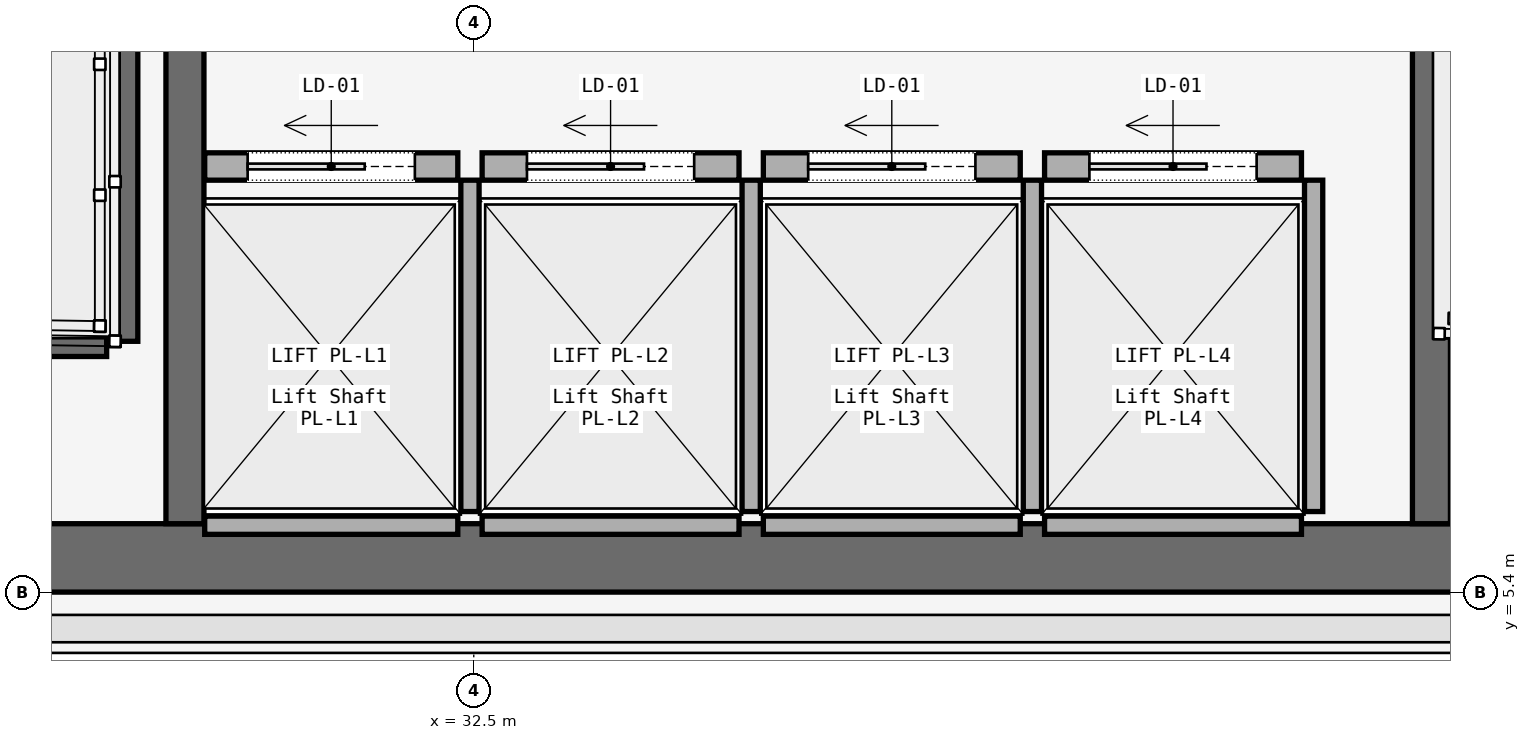
"""IFC4 building model, lengths in metres.
Left out: names, types, materials, properties, quantities, classifications, styles, units other than length and angle.
Written with IfcOpenShell. Run it as: python <this file> out.ifc"""

import sys

from ifc_helpers import new_model, si_unit, direction, frame, frame_2d, origin, place, context, subcontext, project, spatial, rectangle, extrude, element, fill, save


model = new_model("IFC4")
c1 = context("Model", 3, precision=1e-05, world=origin(), true_north=direction((0.0, 1.0)))
c2 = subcontext(c1, "Body", "Model", "MODEL_VIEW")
j1 = project(units=[si_unit("LENGTHUNIT", "METRE"), si_unit("PLANEANGLEUNIT", "RADIAN")], contexts=[c1])
p1 = place(None, origin())
s1 = spatial("IfcSite", under=j1, at=p1, CompositionType="ELEMENT")
p2 = place(p1, origin())
s2 = spatial("IfcBuilding", under=s1, at=p2, CompositionType="ELEMENT")
p3 = place(p2, frame((0.0, 0.0, 58.8)))
s3 = spatial("IfcBuildingStorey", under=s2, at=p3, CompositionType="ELEMENT", Elevation=58.8)
p4 = place(p3, frame((26.45, 5.625, 0.0), z_axis=(0.0, 0.0, 1.0), x_axis=(1.0, 0.0, 0.0)))
e1 = element("IfcWall", 1, at=p4, inside=s3, PredefinedType="SOLIDWALL", context=c2, shape_type="SweptSolid", body=[
    extrude(rectangle(XDim=31.1, YDim=0.45, at=frame_2d((15.55, 0.0))), origin(), (0.0, 0.0, 1.0), 3.58),
])
for number, where, z_axis, x_axis in (
    (2, (30.6, 5.85, 0.0), (0.0, 0.0, 1.0), (0.0, 1.0, 0.0)),
    (3, (38.8, 5.85, 0.0), (0.0, 0.0, 1.0), (0.0, 1.0, 0.0)),
):
    element("IfcWall", number, at=place(p3, frame(where, z_axis=z_axis, x_axis=x_axis)), inside=s3, PredefinedType="SOLIDWALL", context=c2, shape_type="SweptSolid", body=[
        extrude(rectangle(XDim=8.9, YDim=0.25, at=frame_2d((4.45, 0.0))), origin(), (0.0, 0.0, 1.0), 3.58),
    ])
p5 = place(p3, frame((30.19, 14.7, 0.0), z_axis=(0.0, 0.0, 1.0), x_axis=(0.0, -1.0, 0.0)))
e4 = element("IfcWall", 4, at=p5, inside=s3, PredefinedType="SOLIDWALL", context=c2, shape_type="SweptSolid", body=[
    extrude(rectangle(XDim=7.65, YDim=0.2, at=frame_2d((3.825, 0.0))), origin(), (0.0, 0.0, 1.0), 3.8),
])
p6 = place(p3, frame((26.97, 7.05, 0.0), z_axis=(0.0, 0.0, 1.0), x_axis=(1.0, 0.0, 0.0)))
e5 = element("IfcWall", 5, at=p6, inside=s3, PredefinedType="SOLIDWALL", context=c2, shape_type="SweptSolid", body=[
    extrude(rectangle(XDim=3.115, YDim=0.2, at=frame_2d((1.558, 0.0))), origin(), (0.0, 0.0, 1.0), 3.8),
])
p7 = place(p3, frame((30.73, 8.2, 0.0), z_axis=(0.0, 0.0, 1.0), x_axis=(1.0, 0.0, 0.0)))
e6 = element("IfcWall", 6, at=p7, inside=s3, PredefinedType="SOLIDWALL", context=c2, shape_type="SweptSolid", body=[
    extrude(rectangle(XDim=1.665, YDim=0.18, at=frame_2d((0.833, 0.0))), origin(), (0.0, 0.0, 1.0), 2.933),
])
p8 = place(p7, frame((0.282, 0.0, 0.0)))
e7 = element("IfcOpeningElement", 7, at=p8, cuts=e6, PredefinedType="OPENING", context=c2, shape_type="SweptSolid", body=[
    extrude(rectangle(XDim=1.1, YDim=2.2, at=frame_2d((0.55, 1.1))), frame((0.0, 0.09, 0.0), z_axis=(0.0, -1.0, 0.0), x_axis=(1.0, 0.0, 0.0)), (0.0, 0.0, 1.0), 0.18),
])
p9 = place(p3, frame((30.73, 5.84, 0.0), z_axis=(0.0, 0.0, 1.0), x_axis=(1.0, 0.0, 0.0)))
e8 = element("IfcWall", 8, at=p9, inside=s3, PredefinedType="SOLIDWALL", context=c2, shape_type="SweptSolid", body=[
    extrude(rectangle(XDim=1.665, YDim=0.12, at=frame_2d((0.833, 0.0))), origin(), (0.0, 0.0, 1.0), 2.933),
])
p10 = place(p3, frame((32.475, 5.93, 0.0), z_axis=(0.0, 0.0, 1.0), x_axis=(0.0, 1.0, 0.0)))
e9 = element("IfcWall", 9, at=p10, inside=s3, PredefinedType="SOLIDWALL", context=c2, shape_type="SweptSolid", body=[
    extrude(rectangle(XDim=2.18, YDim=0.12, at=frame_2d((1.09, 0.0))), origin(), (0.0, 0.0, 1.0), 2.933),
])
p11 = place(p3, frame((32.555, 8.2, 0.0), z_axis=(0.0, 0.0, 1.0), x_axis=(1.0, 0.0, 0.0)))
e10 = element("IfcWall", 10, at=p11, inside=s3, PredefinedType="SOLIDWALL", context=c2, shape_type="SweptSolid", body=[
    extrude(rectangle(XDim=1.69, YDim=0.18, at=frame_2d((0.845, 0.0))), origin(), (0.0, 0.0, 1.0), 2.933),
])
p12 = place(p11, frame((0.295, 0.0, 0.0)))
e11 = element("IfcOpeningElement", 11, at=p12, cuts=e10, PredefinedType="OPENING", context=c2, shape_type="SweptSolid", body=[
    extrude(rectangle(XDim=1.1, YDim=2.2, at=frame_2d((0.55, 1.1))), frame((0.0, 0.09, 0.0), z_axis=(0.0, -1.0, 0.0), x_axis=(1.0, 0.0, 0.0)), (0.0, 0.0, 1.0), 0.18),
])
p13 = place(p3, frame((32.555, 5.84, 0.0), z_axis=(0.0, 0.0, 1.0), x_axis=(1.0, 0.0, 0.0)))
e12 = element("IfcWall", 12, at=p13, inside=s3, PredefinedType="SOLIDWALL", context=c2, shape_type="SweptSolid", body=[
    extrude(rectangle(XDim=1.69, YDim=0.12, at=frame_2d((0.845, 0.0))), origin(), (0.0, 0.0, 1.0), 2.933),
])
p14 = place(p3, frame((34.325, 5.93, 0.0), z_axis=(0.0, 0.0, 1.0), x_axis=(0.0, 1.0, 0.0)))
e13 = element("IfcWall", 13, at=p14, inside=s3, PredefinedType="SOLIDWALL", context=c2, shape_type="SweptSolid", body=[
    extrude(rectangle(XDim=2.18, YDim=0.12, at=frame_2d((1.09, 0.0))), origin(), (0.0, 0.0, 1.0), 2.933),
])
p15 = place(p3, frame((34.405, 8.2, 0.0), z_axis=(0.0, 0.0, 1.0), x_axis=(1.0, 0.0, 0.0)))
e14 = element("IfcWall", 14, at=p15, inside=s3, PredefinedType="SOLIDWALL", context=c2, shape_type="SweptSolid", body=[
    extrude(rectangle(XDim=1.69, YDim=0.18, at=frame_2d((0.845, 0.0))), origin(), (0.0, 0.0, 1.0), 2.933),
])
p16 = place(p15, frame((0.295, 0.0, 0.0)))
e15 = element("IfcOpeningElement", 15, at=p16, cuts=e14, PredefinedType="OPENING", context=c2, shape_type="SweptSolid", body=[
    extrude(rectangle(XDim=1.1, YDim=2.2, at=frame_2d((0.55, 1.1))), frame((0.0, 0.09, 0.0), z_axis=(0.0, -1.0, 0.0), x_axis=(1.0, 0.0, 0.0)), (0.0, 0.0, 1.0), 0.18),
])
p17 = place(p3, frame((34.405, 5.84, 0.0), z_axis=(0.0, 0.0, 1.0), x_axis=(1.0, 0.0, 0.0)))
e16 = element("IfcWall", 16, at=p17, inside=s3, PredefinedType="SOLIDWALL", context=c2, shape_type="SweptSolid", body=[
    extrude(rectangle(XDim=1.69, YDim=0.12, at=frame_2d((0.845, 0.0))), origin(), (0.0, 0.0, 1.0), 2.933),
])
p18 = place(p3, frame((36.175, 5.93, 0.0), z_axis=(0.0, 0.0, 1.0), x_axis=(0.0, 1.0, 0.0)))
e17 = element("IfcWall", 17, at=p18, inside=s3, PredefinedType="SOLIDWALL", context=c2, shape_type="SweptSolid", body=[
    extrude(rectangle(XDim=2.18, YDim=0.12, at=frame_2d((1.09, 0.0))), origin(), (0.0, 0.0, 1.0), 2.933),
])
p19 = place(p3, frame((36.255, 8.2, 0.0), z_axis=(0.0, 0.0, 1.0), x_axis=(1.0, 0.0, 0.0)))
e18 = element("IfcWall", 18, at=p19, inside=s3, PredefinedType="SOLIDWALL", context=c2, shape_type="SweptSolid", body=[
    extrude(rectangle(XDim=1.69, YDim=0.18, at=frame_2d((0.845, 0.0))), origin(), (0.0, 0.0, 1.0), 2.933),
])
p20 = place(p19, frame((0.295, 0.0, 0.0)))
e19 = element("IfcOpeningElement", 19, at=p20, cuts=e18, PredefinedType="OPENING", context=c2, shape_type="SweptSolid", body=[
    extrude(rectangle(XDim=1.1, YDim=2.2, at=frame_2d((0.55, 1.1))), frame((0.0, 0.09, 0.0), z_axis=(0.0, -1.0, 0.0), x_axis=(1.0, 0.0, 0.0)), (0.0, 0.0, 1.0), 0.18),
])
p21 = place(p3, frame((36.255, 5.84, 0.0), z_axis=(0.0, 0.0, 1.0), x_axis=(1.0, 0.0, 0.0)))
e20 = element("IfcWall", 20, at=p21, inside=s3, PredefinedType="SOLIDWALL", context=c2, shape_type="SweptSolid", body=[
    extrude(rectangle(XDim=1.69, YDim=0.12, at=frame_2d((0.845, 0.0))), origin(), (0.0, 0.0, 1.0), 2.933),
])
p22 = place(p3, frame((38.025, 5.93, 0.0), z_axis=(0.0, 0.0, 1.0), x_axis=(0.0, 1.0, 0.0)))
e21 = element("IfcWall", 21, at=p22, inside=s3, PredefinedType="SOLIDWALL", context=c2, shape_type="SweptSolid", body=[
    extrude(rectangle(XDim=2.18, YDim=0.12, at=frame_2d((1.09, 0.0))), origin(), (0.0, 0.0, 1.0), 2.933),
])
p23 = place(p8, origin())
e22 = element("IfcDoor", 22, at=p23, inside=s3, OperationType="SLIDING_TO_LEFT", PredefinedType="DOOR", context=c2, shape_type="SweptSolid", body=[
    extrude(rectangle(XDim=1.1, YDim=2.2, at=frame_2d((0.55, 1.1))), frame((0.0, 0.025, 0.0), z_axis=(0.0, -1.0, 0.0), x_axis=(1.0, 0.0, 0.0)), (0.0, 0.0, 1.0), 0.05),
])
fill(e7, e22)
p24 = place(p12, origin())
e23 = element("IfcDoor", 23, at=p24, inside=s3, OperationType="SLIDING_TO_LEFT", PredefinedType="DOOR", context=c2, shape_type="SweptSolid", body=[
    extrude(rectangle(XDim=1.1, YDim=2.2, at=frame_2d((0.55, 1.1))), frame((0.0, 0.025, 0.0), z_axis=(0.0, -1.0, 0.0), x_axis=(1.0, 0.0, 0.0)), (0.0, 0.0, 1.0), 0.05),
])
fill(e11, e23)
p25 = place(p16, origin())
e24 = element("IfcDoor", 24, at=p25, inside=s3, OperationType="SLIDING_TO_LEFT", PredefinedType="DOOR", context=c2, shape_type="SweptSolid", body=[
    extrude(rectangle(XDim=1.1, YDim=2.2, at=frame_2d((0.55, 1.1))), frame((0.0, 0.025, 0.0), z_axis=(0.0, -1.0, 0.0), x_axis=(1.0, 0.0, 0.0)), (0.0, 0.0, 1.0), 0.05),
])
fill(e15, e24)
p26 = place(p20, origin())
e25 = element("IfcDoor", 25, at=p26, inside=s3, OperationType="SLIDING_TO_LEFT", PredefinedType="DOOR", context=c2, shape_type="SweptSolid", body=[
    extrude(rectangle(XDim=1.1, YDim=2.2, at=frame_2d((0.55, 1.1))), frame((0.0, 0.025, 0.0), z_axis=(0.0, -1.0, 0.0), x_axis=(1.0, 0.0, 0.0)), (0.0, 0.0, 1.0), 0.05),
])
fill(e19, e25)
save(model, sys.argv[1])
